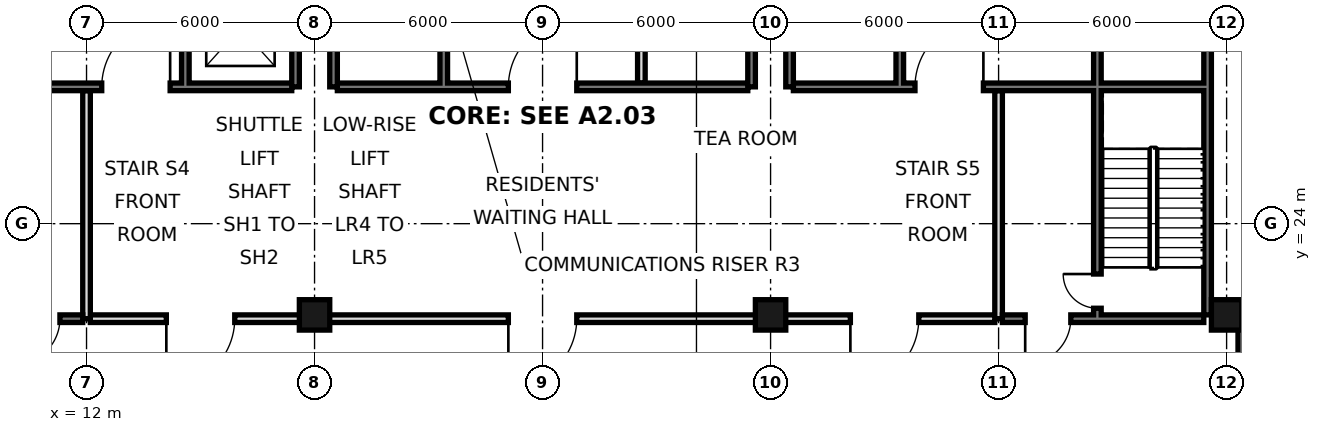
"""IFC4 building model, lengths in metres.
Left out: names, types, materials, properties, quantities, classifications, styles, units other than length and angle.
Written with IfcOpenShell. Run it as: python <this file> out.ifc"""

import sys

from ifc_helpers import new_model, si_unit, direction, frame, frame_2d, origin, origin_2d, place, context, subcontext, project, spatial, rectangle, hollow_rectangle, extrude, element, fill, save


model = new_model("IFC4")
c1 = context("Model", 3, precision=1e-05, world=origin(), true_north=direction((0.0, 1.0)))
c2 = subcontext(c1, "Body", "Model", "MODEL_VIEW")
j1 = project(units=[si_unit("LENGTHUNIT", "METRE"), si_unit("PLANEANGLEUNIT", "RADIAN")], contexts=[c1])
p1 = place(None, origin())
s1 = spatial("IfcSite", under=j1, at=p1, CompositionType="ELEMENT")
p2 = place(p1, origin())
s2 = spatial("IfcBuilding", under=s1, at=p2, CompositionType="ELEMENT")
p3 = place(p2, frame((0.0, 0.0, -4.5)))
s3 = spatial("IfcBuildingStorey", under=s2, at=p3, CompositionType="ELEMENT", Elevation=-4.5)
for number, where, z_axis, x_axis in (
    (1, (18.0, 21.6, 0.0), (0.0, 0.0, 1.0), (1.0, 0.0, 0.0)),
    (2, (30.0, 21.6, 0.0), (0.0, 0.0, 1.0), (1.0, 0.0, 0.0)),
    (3, (42.0, 21.6, 0.0), (0.0, 0.0, 1.0), (1.0, 0.0, 0.0)),
):
    element("IfcColumn", number, at=place(p3, frame(where, z_axis=z_axis, x_axis=x_axis)), inside=s3, PredefinedType="COLUMN", context=c2, shape_type="SweptSolid", body=[
        extrude(hollow_rectangle(XDim=0.8, YDim=0.8, WallThickness=0.07, at=origin_2d()), origin(), (0.0, 0.0, 1.0), 4.5),
    ])
p4 = place(p3, frame((42.4, 17.7, 0.0), z_axis=(0.0, 0.0, 1.0), x_axis=(0.0, 1.0, 0.0)))
e4 = element("IfcWall", 4, at=p4, inside=s3, PredefinedType="SOLIDWALL", context=c2, shape_type="SweptSolid", body=[
    extrude(rectangle(XDim=3.9, YDim=0.2, at=frame_2d((1.95, 0.0))), origin(), (0.0, 0.0, 1.0), 4.14),
])
p5 = place(p3, frame((41.5, 21.6, 0.0), z_axis=(0.0, 0.0, 1.0), x_axis=(0.0, 1.0, 0.0)))
e5 = element("IfcWall", 5, at=p5, inside=s3, PredefinedType="SOLIDWALL", context=c2, shape_type="SweptSolid", body=[
    extrude(rectangle(XDim=23.5, YDim=0.2, at=frame_2d((11.75, 0.0))), origin(), (0.0, 0.0, 1.0), 4.14),
])
for number, where, z_axis, x_axis in (
    (6, (17.5, 27.6, 0.0), (0.0, 0.0, 1.0), (0.0, 1.0, 0.0)),
    (7, (18.5, 27.6, 0.0), (0.0, 0.0, 1.0), (0.0, 1.0, 0.0)),
    (8, (29.5, 27.6, 0.0), (0.0, 0.0, 1.0), (0.0, 1.0, 0.0)),
    (9, (30.5, 27.6, 0.0), (0.0, 0.0, 1.0), (0.0, 1.0, 0.0)),
):
    element("IfcWall", number, at=place(p3, frame(where, z_axis=z_axis, x_axis=x_axis)), inside=s3, PredefinedType="SOLIDWALL", context=c2, shape_type="SweptSolid", body=[
        extrude(rectangle(XDim=17.5, YDim=0.2, at=frame_2d((8.75, 0.0))), origin(), (0.0, 0.0, 1.0), 4.14),
    ])
p6 = place(p3, frame((12.1, 21.5, 0.0), z_axis=(0.0, 0.0, 1.0), x_axis=(1.0, 0.0, 0.0)))
e10 = element("IfcWall", 10, at=p6, inside=s3, PredefinedType="SOLIDWALL", context=c2, shape_type="SweptSolid", body=[
    extrude(rectangle(XDim=23.8, YDim=0.2, at=frame_2d((11.9, 0.0))), origin(), (0.0, 0.0, 1.0), 3.04),
])
p7 = place(p6, frame((2.0, 0.0, 0.0)))
e11 = element("IfcOpeningElement", 11, at=p7, cuts=e10, PredefinedType="OPENING", context=c2, shape_type="SweptSolid", body=[
    extrude(rectangle(XDim=1.8, YDim=2.1, at=frame_2d((0.9, 1.05))), frame((0.0, 0.11, 0.0), z_axis=(0.0, -1.0, 0.0), x_axis=(1.0, 0.0, 0.0)), (0.0, 0.0, 1.0), 0.22),
])
p8 = place(p6, frame((11.0, 0.0, 0.0)))
e12 = element("IfcOpeningElement", 12, at=p8, cuts=e10, PredefinedType="OPENING", context=c2, shape_type="SweptSolid", body=[
    extrude(rectangle(XDim=1.8, YDim=2.1, at=frame_2d((0.9, 1.05))), frame((0.0, 0.11, 0.0), z_axis=(0.0, -1.0, 0.0), x_axis=(1.0, 0.0, 0.0)), (0.0, 0.0, 1.0), 0.22),
])
p9 = place(p6, frame((20.0, 0.0, 0.0)))
e13 = element("IfcOpeningElement", 13, at=p9, cuts=e10, PredefinedType="OPENING", context=c2, shape_type="SweptSolid", body=[
    extrude(rectangle(XDim=1.8, YDim=2.1, at=frame_2d((0.9, 1.05))), frame((0.0, 0.11, 0.0), z_axis=(0.0, -1.0, 0.0), x_axis=(1.0, 0.0, 0.0)), (0.0, 0.0, 1.0), 0.22),
])
p10 = place(p3, frame((12.0, 21.5, 0.0), z_axis=(0.0, 0.0, 1.0), x_axis=(0.0, 1.0, 0.0)))
e14 = element("IfcWall", 14, at=p10, inside=s3, PredefinedType="PARTITIONING", context=c2, shape_type="SweptSolid", body=[
    extrude(rectangle(XDim=6.0, YDim=0.2, at=frame_2d((3.0, 0.0))), origin(), (0.0, 0.0, 1.0), 3.04),
])
p11 = place(p3, frame((14.6, 27.7, 0.0), z_axis=(0.0, 0.0, 1.0), x_axis=(0.0, 1.0, 0.0)))
e15 = element("IfcWall", 15, at=p11, inside=s3, PredefinedType="SOLIDWALL", context=c2, shape_type="SweptSolid", body=[
    extrude(rectangle(XDim=17.3, YDim=0.2, at=frame_2d((8.65, 0.0))), origin(), (0.0, 0.0, 1.0), 4.14),
])
p12 = place(p11, frame((0.9, 0.0, 0.0)))
e16 = element("IfcOpeningElement", 16, at=p12, cuts=e15, PredefinedType="OPENING", context=c2, shape_type="SweptSolid", body=[
    extrude(rectangle(XDim=1.1, YDim=2.1, at=frame_2d((0.55, 1.05))), frame((0.0, 0.11, 0.0), z_axis=(0.0, -1.0, 0.0), x_axis=(1.0, 0.0, 0.0)), (0.0, 0.0, 1.0), 0.22),
])
p13 = place(p11, frame((4.0, 0.0, 0.0)))
e17 = element("IfcOpeningElement", 17, at=p13, cuts=e15, PredefinedType="OPENING", context=c2, shape_type="SweptSolid", body=[
    extrude(rectangle(XDim=1.1, YDim=2.1, at=frame_2d((0.55, 1.05))), frame((0.0, 0.11, 0.0), z_axis=(0.0, -1.0, 0.0), x_axis=(1.0, 0.0, 0.0)), (0.0, 0.0, 1.0), 0.22),
])
p14 = place(p11, frame((15.2, 0.0, 0.0)))
e18 = element("IfcOpeningElement", 18, at=p14, cuts=e15, PredefinedType="OPENING", context=c2, shape_type="SweptSolid", body=[
    extrude(rectangle(XDim=1.1, YDim=2.1, at=frame_2d((0.55, 1.05))), frame((0.0, 0.11, 0.0), z_axis=(0.0, -1.0, 0.0), x_axis=(1.0, 0.0, 0.0)), (0.0, 0.0, 1.0), 0.22),
])
p15 = place(p11, frame((9.7, 0.0, 0.0)))
e19 = element("IfcOpeningElement", 19, at=p15, cuts=e15, PredefinedType="OPENING", context=c2, shape_type="SweptSolid", body=[
    extrude(rectangle(XDim=0.9, YDim=2.1, at=frame_2d((0.45, 1.05))), frame((0.0, 0.11, 0.0), z_axis=(0.0, -1.0, 0.0), x_axis=(1.0, 0.0, 0.0)), (0.0, 0.0, 1.0), 0.22),
])
p16 = place(p3, frame((21.4, 27.7, 0.0), z_axis=(0.0, 0.0, 1.0), x_axis=(0.0, 1.0, 0.0)))
e20 = element("IfcWall", 20, at=p16, inside=s3, PredefinedType="SOLIDWALL", context=c2, shape_type="SweptSolid", body=[
    extrude(rectangle(XDim=17.3, YDim=0.2, at=frame_2d((8.65, 0.0))), origin(), (0.0, 0.0, 1.0), 4.14),
])
p17 = place(p16, frame((16.0, 0.0, 0.0)))
e21 = element("IfcOpeningElement", 21, at=p17, cuts=e20, PredefinedType="OPENING", context=c2, shape_type="SweptSolid", body=[
    extrude(rectangle(XDim=1.0, YDim=2.1, at=frame_2d((0.5, 1.05))), frame((0.0, 0.11, 0.0), z_axis=(0.0, -1.0, 0.0), x_axis=(1.0, 0.0, 0.0)), (0.0, 0.0, 1.0), 0.22),
])
p18 = place(p16, frame((7.2, 0.0, 0.0)))
e22 = element("IfcOpeningElement", 22, at=p18, cuts=e20, PredefinedType="OPENING", context=c2, shape_type="SweptSolid", body=[
    extrude(rectangle(XDim=0.9, YDim=2.1, at=frame_2d((0.45, 1.05))), frame((0.0, 0.11, 0.0), z_axis=(0.0, -1.0, 0.0), x_axis=(1.0, 0.0, 0.0)), (0.0, 0.0, 1.0), 0.22),
])
p19 = place(p3, frame((26.6, 27.7, 0.0), z_axis=(0.0, 0.0, 1.0), x_axis=(0.0, 1.0, 0.0)))
e23 = element("IfcWall", 23, at=p19, inside=s3, PredefinedType="SOLIDWALL", context=c2, shape_type="SweptSolid", body=[
    extrude(rectangle(XDim=17.3, YDim=0.2, at=frame_2d((8.65, 0.0))), origin(), (0.0, 0.0, 1.0), 4.14),
])
p20 = place(p19, frame((4.1, 0.0, 0.0)))
e24 = element("IfcOpeningElement", 24, at=p20, cuts=e23, PredefinedType="OPENING", context=c2, shape_type="SweptSolid", body=[
    extrude(rectangle(XDim=0.9, YDim=2.1, at=frame_2d((0.45, 1.05))), frame((0.0, 0.11, 0.0), z_axis=(0.0, -1.0, 0.0), x_axis=(1.0, 0.0, 0.0)), (0.0, 0.0, 1.0), 0.22),
])
p21 = place(p19, frame((10.15, 0.0, 0.0)))
e25 = element("IfcOpeningElement", 25, at=p21, cuts=e23, PredefinedType="OPENING", context=c2, shape_type="SweptSolid", body=[
    extrude(rectangle(XDim=1.0, YDim=2.1, at=frame_2d((0.5, 1.05))), frame((0.0, 0.11, 0.0), z_axis=(0.0, -1.0, 0.0), x_axis=(1.0, 0.0, 0.0)), (0.0, 0.0, 1.0), 0.22),
])
p22 = place(p19, frame((14.375, 0.0, 0.0)))
e26 = element("IfcOpeningElement", 26, at=p22, cuts=e23, PredefinedType="OPENING", context=c2, shape_type="SweptSolid", body=[
    extrude(rectangle(XDim=1.0, YDim=2.1, at=frame_2d((0.5, 1.05))), frame((0.0, 0.11, 0.0), z_axis=(0.0, -1.0, 0.0), x_axis=(1.0, 0.0, 0.0)), (0.0, 0.0, 1.0), 0.22),
])
p23 = place(p3, frame((33.4, 27.7, 0.0), z_axis=(0.0, 0.0, 1.0), x_axis=(0.0, 1.0, 0.0)))
e27 = element("IfcWall", 27, at=p23, inside=s3, PredefinedType="SOLIDWALL", context=c2, shape_type="SweptSolid", body=[
    extrude(rectangle(XDim=17.3, YDim=0.2, at=frame_2d((8.65, 0.0))), origin(), (0.0, 0.0, 1.0), 3.04),
])
p24 = place(p23, frame((15.2, 0.0, 0.0)))
e28 = element("IfcOpeningElement", 28, at=p24, cuts=e27, PredefinedType="OPENING", context=c2, shape_type="SweptSolid", body=[
    extrude(rectangle(XDim=1.1, YDim=2.1, at=frame_2d((0.55, 1.05))), frame((0.0, 0.11, 0.0), z_axis=(0.0, -1.0, 0.0), x_axis=(1.0, 0.0, 0.0)), (0.0, 0.0, 1.0), 0.22),
])
p25 = place(p23, frame((2.5, 0.0, 0.0)))
e29 = element("IfcOpeningElement", 29, at=p25, cuts=e27, PredefinedType="OPENING", context=c2, shape_type="SweptSolid", body=[
    extrude(rectangle(XDim=1.0, YDim=2.1, at=frame_2d((0.5, 1.05))), frame((0.0, 0.11, 0.0), z_axis=(0.0, -1.0, 0.0), x_axis=(1.0, 0.0, 0.0)), (0.0, 0.0, 1.0), 0.22),
])
p26 = place(p23, frame((9.7, 0.0, 0.0)))
e30 = element("IfcOpeningElement", 30, at=p26, cuts=e27, PredefinedType="OPENING", context=c2, shape_type="SweptSolid", body=[
    extrude(rectangle(XDim=0.9, YDim=2.1, at=frame_2d((0.45, 1.05))), frame((0.0, 0.11, 0.0), z_axis=(0.0, -1.0, 0.0), x_axis=(1.0, 0.0, 0.0)), (0.0, 0.0, 1.0), 0.22),
])
p27 = place(p3, frame((36.0, 21.5, 0.0), z_axis=(0.0, 0.0, 1.0), x_axis=(0.0, 1.0, 0.0)))
e31 = element("IfcWall", 31, at=p27, inside=s3, PredefinedType="PARTITIONING", context=c2, shape_type="SweptSolid", body=[
    extrude(rectangle(XDim=6.0, YDim=0.2, at=frame_2d((3.0, 0.0))), origin(), (0.0, 0.0, 1.0), 3.04),
])
p28 = place(p3, frame((38.6, 21.5, 0.0), z_axis=(0.0, 0.0, 1.0), x_axis=(0.0, 1.0, 0.0)))
e32 = element("IfcWall", 32, at=p28, inside=s3, PredefinedType="SOLIDWALL", context=c2, shape_type="SweptSolid", body=[
    extrude(rectangle(XDim=23.5, YDim=0.2, at=frame_2d((11.75, 0.0))), origin(), (0.0, 0.0, 1.0), 3.04),
])
p29 = place(p28, frame((8.7, 0.0, 0.0)))
e33 = element("IfcOpeningElement", 33, at=p29, cuts=e32, PredefinedType="OPENING", context=c2, shape_type="SweptSolid", body=[
    extrude(rectangle(XDim=1.0, YDim=2.1, at=frame_2d((0.5, 1.05))), frame((0.0, 0.11, 0.0), z_axis=(0.0, -1.0, 0.0), x_axis=(1.0, 0.0, 0.0)), (0.0, 0.0, 1.0), 0.22),
])
p30 = place(p28, frame((13.35, 0.0, 0.0)))
e34 = element("IfcOpeningElement", 34, at=p30, cuts=e32, PredefinedType="OPENING", context=c2, shape_type="SweptSolid", body=[
    extrude(rectangle(XDim=1.0, YDim=2.1, at=frame_2d((0.5, 1.05))), frame((0.0, 0.11, 0.0), z_axis=(0.0, -1.0, 0.0), x_axis=(1.0, 0.0, 0.0)), (0.0, 0.0, 1.0), 0.22),
])
p31 = place(p28, frame((22.2, 0.0, 0.0)))
e35 = element("IfcOpeningElement", 35, at=p31, cuts=e32, PredefinedType="OPENING", context=c2, shape_type="SweptSolid", body=[
    extrude(rectangle(XDim=1.0, YDim=2.1, at=frame_2d((0.5, 1.05))), frame((0.0, 0.11, 0.0), z_axis=(0.0, -1.0, 0.0), x_axis=(1.0, 0.0, 0.0)), (0.0, 0.0, 1.0), 0.22),
])
p32 = place(p28, frame((0.275, 0.0, 0.0)))
e36 = element("IfcOpeningElement", 36, at=p32, cuts=e32, PredefinedType="OPENING", context=c2, shape_type="SweptSolid", body=[
    extrude(rectangle(XDim=0.9, YDim=2.1, at=frame_2d((0.45, 1.05))), frame((0.0, 0.11, 0.0), z_axis=(0.0, -1.0, 0.0), x_axis=(1.0, 0.0, 0.0)), (0.0, 0.0, 1.0), 0.22),
])
p33 = place(p3, frame((36.1, 21.5, 0.0), z_axis=(0.0, 0.0, 1.0), x_axis=(1.0, 0.0, 0.0)))
e37 = element("IfcWall", 37, at=p33, inside=s3, PredefinedType="SOLIDWALL", context=c2, shape_type="SweptSolid", body=[
    extrude(rectangle(XDim=5.3, YDim=0.2, at=frame_2d((2.65, 0.0))), origin(), (0.0, 0.0, 1.0), 3.04),
])
p34 = place(p33, frame((0.6, 0.0, 0.0)))
e38 = element("IfcOpeningElement", 38, at=p34, cuts=e37, PredefinedType="OPENING", context=c2, shape_type="SweptSolid", body=[
    extrude(rectangle(XDim=1.2, YDim=2.1, at=frame_2d((0.6, 1.05))), frame((0.0, 0.11, 0.0), z_axis=(0.0, -1.0, 0.0), x_axis=(1.0, 0.0, 0.0)), (0.0, 0.0, 1.0), 0.22),
])
p35 = place(p3, frame((6.6, 21.5, 0.0), z_axis=(0.0, 0.0, 1.0), x_axis=(1.0, 0.0, 0.0)))
e39 = element("IfcWall", 39, at=p35, inside=s3, PredefinedType="SOLIDWALL", context=c2, shape_type="SweptSolid", body=[
    extrude(rectangle(XDim=5.3, YDim=0.2, at=frame_2d((2.65, 0.0))), origin(), (0.0, 0.0, 1.0), 3.04),
])
p36 = place(p35, frame((3.5, 0.0, 0.0)))
e40 = element("IfcOpeningElement", 40, at=p36, cuts=e39, PredefinedType="OPENING", context=c2, shape_type="SweptSolid", body=[
    extrude(rectangle(XDim=1.2, YDim=2.1, at=frame_2d((0.6, 1.05))), frame((0.0, 0.11, 0.0), z_axis=(0.0, -1.0, 0.0), x_axis=(1.0, 0.0, 0.0)), (0.0, 0.0, 1.0), 0.22),
])
p37 = place(p3, frame((18.6, 27.6, 0.0), z_axis=(0.0, 0.0, 1.0), x_axis=(1.0, 0.0, 0.0)))
e41 = element("IfcWall", 41, at=p37, inside=s3, PredefinedType="SOLIDWALL", context=c2, shape_type="SweptSolid", body=[
    extrude(rectangle(XDim=10.8, YDim=0.2, at=frame_2d((5.4, 0.0))), origin(), (0.0, 0.0, 1.0), 4.14),
])
p38 = place(p37, frame((4.5, 0.0, 0.0)))
e42 = element("IfcOpeningElement", 42, at=p38, cuts=e41, PredefinedType="OPENING", context=c2, shape_type="SweptSolid", body=[
    extrude(rectangle(XDim=1.8, YDim=2.1, at=frame_2d((0.9, 1.05))), frame((0.0, 0.11, 0.0), z_axis=(0.0, -1.0, 0.0), x_axis=(1.0, 0.0, 0.0)), (0.0, 0.0, 1.0), 0.22),
])
p39 = place(p3, frame((30.6, 27.6, 0.0), z_axis=(0.0, 0.0, 1.0), x_axis=(1.0, 0.0, 0.0)))
e43 = element("IfcWall", 43, at=p39, inside=s3, PredefinedType="SOLIDWALL", context=c2, shape_type="SweptSolid", body=[
    extrude(rectangle(XDim=10.8, YDim=0.2, at=frame_2d((5.4, 0.0))), origin(), (0.0, 0.0, 1.0), 4.14),
])
p40 = place(p39, frame((3.2, 0.0, 0.0)))
e44 = element("IfcOpeningElement", 44, at=p40, cuts=e43, PredefinedType="OPENING", context=c2, shape_type="SweptSolid", body=[
    extrude(rectangle(XDim=1.8, YDim=2.1, at=frame_2d((0.9, 1.05))), frame((0.0, 0.11, 0.0), z_axis=(0.0, -1.0, 0.0), x_axis=(1.0, 0.0, 0.0)), (0.0, 0.0, 1.0), 0.22),
])
p41 = place(p3, frame((6.6, 27.6, 0.0), z_axis=(0.0, 0.0, 1.0), x_axis=(1.0, 0.0, 0.0)))
e45 = element("IfcWall", 45, at=p41, inside=s3, PredefinedType="SOLIDWALL", context=c2, shape_type="SweptSolid", body=[
    extrude(rectangle(XDim=10.8, YDim=0.2, at=frame_2d((5.4, 0.0))), origin(), (0.0, 0.0, 1.0), 4.14),
])
p42 = place(p41, frame((5.8, 0.0, 0.0)))
e46 = element("IfcOpeningElement", 46, at=p42, cuts=e45, PredefinedType="OPENING", context=c2, shape_type="SweptSolid", body=[
    extrude(rectangle(XDim=1.8, YDim=2.1, at=frame_2d((0.9, 1.05))), frame((0.0, 0.11, 0.0), z_axis=(0.0, -1.0, 0.0), x_axis=(1.0, 0.0, 0.0)), (0.0, 0.0, 1.0), 0.22),
])
p43 = place(p7, frame((1.8, 0.0, 0.0), z_axis=(0.0, 0.0, 1.0), x_axis=(-1.0, 0.0, 0.0)))
e47 = element("IfcDoor", 47, at=p43, inside=s3, OperationType="SINGLE_SWING_RIGHT", PredefinedType="DOOR", context=c2, shape_type="SweptSolid", body=[
    extrude(rectangle(XDim=1.8, YDim=2.1, at=frame_2d((0.9, 1.05))), frame((0.0, 0.025, 0.0), z_axis=(0.0, -1.0, 0.0), x_axis=(1.0, 0.0, 0.0)), (0.0, 0.0, 1.0), 0.05),
])
fill(e11, e47)
p44 = place(p8, frame((1.8, 0.0, 0.0), z_axis=(0.0, 0.0, 1.0), x_axis=(-1.0, 0.0, 0.0)))
e48 = element("IfcDoor", 48, at=p44, inside=s3, OperationType="SINGLE_SWING_RIGHT", PredefinedType="DOOR", context=c2, shape_type="SweptSolid", body=[
    extrude(rectangle(XDim=1.8, YDim=2.1, at=frame_2d((0.9, 1.05))), frame((0.0, 0.025, 0.0), z_axis=(0.0, -1.0, 0.0), x_axis=(1.0, 0.0, 0.0)), (0.0, 0.0, 1.0), 0.05),
])
fill(e12, e48)
p45 = place(p9, frame((1.8, 0.0, 0.0), z_axis=(0.0, 0.0, 1.0), x_axis=(-1.0, 0.0, 0.0)))
e49 = element("IfcDoor", 49, at=p45, inside=s3, OperationType="SINGLE_SWING_RIGHT", PredefinedType="DOOR", context=c2, shape_type="SweptSolid", body=[
    extrude(rectangle(XDim=1.8, YDim=2.1, at=frame_2d((0.9, 1.05))), frame((0.0, 0.025, 0.0), z_axis=(0.0, -1.0, 0.0), x_axis=(1.0, 0.0, 0.0)), (0.0, 0.0, 1.0), 0.05),
])
fill(e13, e49)
p46 = place(p36, frame((1.2, 0.0, 0.0), z_axis=(0.0, 0.0, 1.0), x_axis=(-1.0, 0.0, 0.0)))
e50 = element("IfcDoor", 50, at=p46, inside=s3, OperationType="SINGLE_SWING_RIGHT", PredefinedType="DOOR", context=c2, shape_type="SweptSolid", body=[
    extrude(rectangle(XDim=1.2, YDim=2.1, at=frame_2d((0.6, 1.05))), frame((0.0, 0.025, 0.0), z_axis=(0.0, -1.0, 0.0), x_axis=(1.0, 0.0, 0.0)), (0.0, 0.0, 1.0), 0.05),
])
fill(e40, e50)
p47 = place(p34, frame((1.2, 0.0, 0.0), z_axis=(0.0, 0.0, 1.0), x_axis=(-1.0, 0.0, 0.0)))
e51 = element("IfcDoor", 51, at=p47, inside=s3, OperationType="SINGLE_SWING_RIGHT", PredefinedType="DOOR", context=c2, shape_type="SweptSolid", body=[
    extrude(rectangle(XDim=1.2, YDim=2.1, at=frame_2d((0.6, 1.05))), frame((0.0, 0.025, 0.0), z_axis=(0.0, -1.0, 0.0), x_axis=(1.0, 0.0, 0.0)), (0.0, 0.0, 1.0), 0.05),
])
fill(e38, e51)
p48 = place(p42, frame((1.8, 0.0, 0.0), z_axis=(0.0, 0.0, 1.0), x_axis=(-1.0, 0.0, 0.0)))
e52 = element("IfcDoor", 52, at=p48, inside=s3, OperationType="SINGLE_SWING_LEFT", PredefinedType="DOOR", context=c2, shape_type="SweptSolid", body=[
    extrude(rectangle(XDim=1.8, YDim=2.1, at=frame_2d((0.9, 1.05))), frame((0.0, 0.025, 0.0), z_axis=(0.0, -1.0, 0.0), x_axis=(1.0, 0.0, 0.0)), (0.0, 0.0, 1.0), 0.05),
])
fill(e46, e52)
p49 = place(p38, frame((1.8, 0.0, 0.0), z_axis=(0.0, 0.0, 1.0), x_axis=(-1.0, 0.0, 0.0)))
e53 = element("IfcDoor", 53, at=p49, inside=s3, OperationType="SINGLE_SWING_LEFT", PredefinedType="DOOR", context=c2, shape_type="SweptSolid", body=[
    extrude(rectangle(XDim=1.8, YDim=2.1, at=frame_2d((0.9, 1.05))), frame((0.0, 0.025, 0.0), z_axis=(0.0, -1.0, 0.0), x_axis=(1.0, 0.0, 0.0)), (0.0, 0.0, 1.0), 0.05),
])
fill(e42, e53)
p50 = place(p40, frame((1.8, 0.0, 0.0), z_axis=(0.0, 0.0, 1.0), x_axis=(-1.0, 0.0, 0.0)))
e54 = element("IfcDoor", 54, at=p50, inside=s3, OperationType="SINGLE_SWING_LEFT", PredefinedType="DOOR", context=c2, shape_type="SweptSolid", body=[
    extrude(rectangle(XDim=1.8, YDim=2.1, at=frame_2d((0.9, 1.05))), frame((0.0, 0.025, 0.0), z_axis=(0.0, -1.0, 0.0), x_axis=(1.0, 0.0, 0.0)), (0.0, 0.0, 1.0), 0.05),
])
fill(e44, e54)
p51 = place(p32, frame((0.9, 0.0, 0.0), z_axis=(0.0, 0.0, 1.0), x_axis=(-1.0, 0.0, 0.0)))
e55 = element("IfcDoor", 55, at=p51, inside=s3, OperationType="SINGLE_SWING_LEFT", PredefinedType="DOOR", context=c2, shape_type="SweptSolid", body=[
    extrude(rectangle(XDim=0.9, YDim=2.1, at=frame_2d((0.45, 1.05))), frame((0.0, 0.025, 0.0), z_axis=(0.0, -1.0, 0.0), x_axis=(1.0, 0.0, 0.0)), (0.0, 0.0, 1.0), 0.05),
])
fill(e36, e55)
save(model, sys.argv[1])
